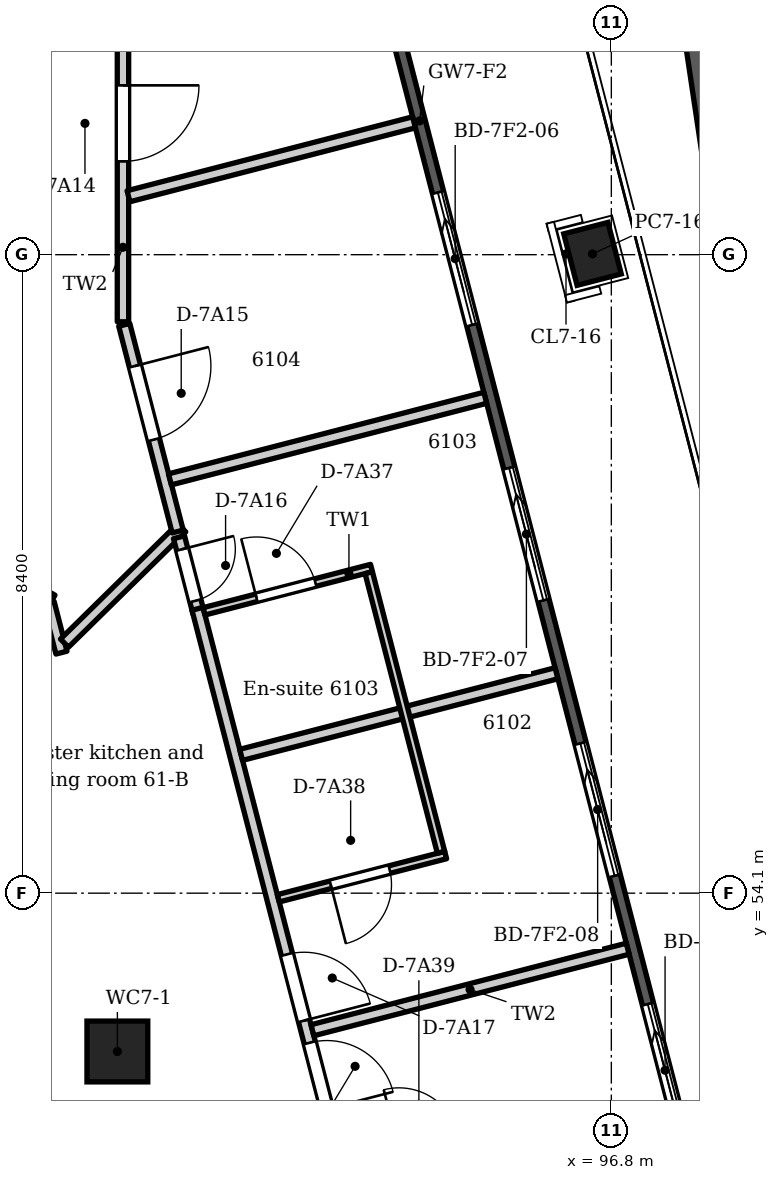
"""IFC4 building model, lengths in metres.
Left out: names, types, materials, properties, quantities, classifications, styles, units other than length and angle.
Written with IfcOpenShell. Run it as: python <this file> out.ifc"""

import sys

from ifc_helpers import new_model, si_unit, direction, frame, frame_2d, origin, origin_2d, place, context, subcontext, project, spatial, polyline, rectangle, circle, outline, extrude, element, fill, save


model = new_model("IFC4")
c1 = context("Model", 3, precision=1e-05, world=origin(), true_north=direction((0.0, 1.0)))
c2 = subcontext(c1, "Body", "Model", "MODEL_VIEW")
j1 = project(units=[si_unit("LENGTHUNIT", "METRE"), si_unit("PLANEANGLEUNIT", "RADIAN")], contexts=[c1])
p1 = place(None, origin())
s1 = spatial("IfcSite", under=j1, at=p1, CompositionType="ELEMENT")
p2 = place(p1, origin())
s2 = spatial("IfcBuilding", under=s1, at=p2, CompositionType="ELEMENT")
p3 = place(p2, frame((0.0, 0.0, 234.9)))
s3 = spatial("IfcBuildingStorey", under=s2, at=p3, CompositionType="ELEMENT", Elevation=234.9)
p4 = place(p3, frame((96.552, 62.51, -0.35), z_axis=(0.0, 0.0, 1.0), x_axis=(-0.250380004054, 0.968147640378, 0.0)))
e1 = element("IfcColumn", 1, at=p4, inside=s3, PredefinedType="COLUMN", context=c2, shape_type="SweptSolid", body=[
    extrude(rectangle(XDim=0.7, YDim=0.6, at=origin_2d()), origin(), (0.0, 0.0, 1.0), 3.95),
])
p5 = place(p3, frame((90.302, 52.017, -0.35), z_axis=(0.0, 0.0, 1.0), x_axis=(1.0, 0.0, 0.0)))
e2 = element("IfcColumn", 2, at=p5, inside=s3, PredefinedType="COLUMN", context=c2, shape_type="SweptSolid", body=[
    extrude(circle(Radius=0.4, at=origin_2d()), origin(), (0.0, 0.0, 1.0), 3.95),
])
p6 = place(p3, frame((89.591, 82.378, 0.0), z_axis=(0.0, 0.0, 1.0), x_axis=(0.250378839788, -0.968147941477, 0.0)))
e3 = element("IfcWall", 3, at=p6, inside=s3, PredefinedType="SOLIDWALL", context=c2, shape_type="SweptSolid", body=[
    extrude(outline(polyline([(0.149, 0.075), (0.149, -0.075), (33.537, -0.075), (33.537, 0.075), (0.149, 0.075)])), origin(), (0.0, 0.0, 1.0), 3.3),
])
p7 = place(p6, frame((1.171, 0.0, 0.0)))
e4 = element("IfcOpeningElement", 4, at=p7, cuts=e3, PredefinedType="OPENING", context=c2, shape_type="SweptSolid", body=[
    extrude(rectangle(XDim=1.8, YDim=2.6, at=frame_2d((0.9, 1.3))), frame((0.0, 0.085, 0.0), z_axis=(0.0, -1.0, 0.0), x_axis=(1.0, 0.0, 0.0)), (0.0, 0.0, 1.0), 0.17),
])
p8 = place(p6, frame((4.714, 0.0, 0.0)))
e5 = element("IfcOpeningElement", 5, at=p8, cuts=e3, PredefinedType="OPENING", context=c2, shape_type="SweptSolid", body=[
    extrude(rectangle(XDim=1.8, YDim=2.6, at=frame_2d((0.9, 1.3))), frame((0.0, 0.085, 0.0), z_axis=(0.0, -1.0, 0.0), x_axis=(1.0, 0.0, 0.0)), (0.0, 0.0, 1.0), 0.17),
])
p9 = place(p6, frame((8.457, 0.0, 0.0)))
e6 = element("IfcOpeningElement", 6, at=p9, cuts=e3, PredefinedType="OPENING", context=c2, shape_type="SweptSolid", body=[
    extrude(rectangle(XDim=1.8, YDim=2.6, at=frame_2d((0.9, 1.3))), frame((0.0, 0.085, 0.0), z_axis=(0.0, -1.0, 0.0), x_axis=(1.0, 0.0, 0.0)), (0.0, 0.0, 1.0), 0.17),
])
p10 = place(p6, frame((12.2, 0.0, 0.0)))
e7 = element("IfcOpeningElement", 7, at=p10, cuts=e3, PredefinedType="OPENING", context=c2, shape_type="SweptSolid", body=[
    extrude(rectangle(XDim=1.8, YDim=2.6, at=frame_2d((0.9, 1.3))), frame((0.0, 0.085, 0.0), z_axis=(0.0, -1.0, 0.0), x_axis=(1.0, 0.0, 0.0)), (0.0, 0.0, 1.0), 0.17),
])
p11 = place(p6, frame((15.943, 0.0, 0.0)))
e8 = element("IfcOpeningElement", 8, at=p11, cuts=e3, PredefinedType="OPENING", context=c2, shape_type="SweptSolid", body=[
    extrude(rectangle(XDim=1.8, YDim=2.6, at=frame_2d((0.9, 1.3))), frame((0.0, 0.085, 0.0), z_axis=(0.0, -1.0, 0.0), x_axis=(1.0, 0.0, 0.0)), (0.0, 0.0, 1.0), 0.17),
])
p12 = place(p6, frame((19.686, 0.0, 0.0)))
e9 = element("IfcOpeningElement", 9, at=p12, cuts=e3, PredefinedType="OPENING", context=c2, shape_type="SweptSolid", body=[
    extrude(rectangle(XDim=1.8, YDim=2.6, at=frame_2d((0.9, 1.3))), frame((0.0, 0.085, 0.0), z_axis=(0.0, -1.0, 0.0), x_axis=(1.0, 0.0, 0.0)), (0.0, 0.0, 1.0), 0.17),
])
p13 = place(p6, frame((23.429, 0.0, 0.0)))
e10 = element("IfcOpeningElement", 10, at=p13, cuts=e3, PredefinedType="OPENING", context=c2, shape_type="SweptSolid", body=[
    extrude(rectangle(XDim=1.8, YDim=2.6, at=frame_2d((0.9, 1.3))), frame((0.0, 0.085, 0.0), z_axis=(0.0, -1.0, 0.0), x_axis=(1.0, 0.0, 0.0)), (0.0, 0.0, 1.0), 0.17),
])
p14 = place(p6, frame((27.172, 0.0, 0.0)))
e11 = element("IfcOpeningElement", 11, at=p14, cuts=e3, PredefinedType="OPENING", context=c2, shape_type="SweptSolid", body=[
    extrude(rectangle(XDim=1.8, YDim=2.6, at=frame_2d((0.9, 1.3))), frame((0.0, 0.085, 0.0), z_axis=(0.0, -1.0, 0.0), x_axis=(1.0, 0.0, 0.0)), (0.0, 0.0, 1.0), 0.17),
])
p15 = place(p6, frame((30.715, 0.0, 0.0)))
e12 = element("IfcOpeningElement", 12, at=p15, cuts=e3, PredefinedType="OPENING", context=c2, shape_type="SweptSolid", body=[
    extrude(rectangle(XDim=1.8, YDim=2.6, at=frame_2d((0.9, 1.3))), frame((0.0, 0.085, 0.0), z_axis=(0.0, -1.0, 0.0), x_axis=(1.0, 0.0, 0.0)), (0.0, 0.0, 1.0), 0.17),
])
p16 = place(p3, frame((92.419, 44.255, 0.0), z_axis=(0.0, 0.0, 1.0), x_axis=(-0.963630586427, 0.267237895708, 0.0)))
e13 = element("IfcWall", 13, at=p16, inside=s3, PredefinedType="SOLIDWALL", context=c2, shape_type="SweptSolid", body=[
    extrude(outline(polyline([(0.149, 0.075), (0.149, -0.075), (33.537, -0.075), (33.537, 0.075), (0.149, 0.075)])), origin(), (0.0, 0.0, 1.0), 3.3),
])
p17 = place(p16, frame((1.171, 0.0, 0.0)))
e14 = element("IfcOpeningElement", 14, at=p17, cuts=e13, PredefinedType="OPENING", context=c2, shape_type="SweptSolid", body=[
    extrude(rectangle(XDim=1.8, YDim=2.6, at=frame_2d((0.9, 1.3))), frame((0.0, 0.085, 0.0), z_axis=(0.0, -1.0, 0.0), x_axis=(1.0, 0.0, 0.0)), (0.0, 0.0, 1.0), 0.17),
])
p18 = place(p16, frame((4.714, 0.0, 0.0)))
e15 = element("IfcOpeningElement", 15, at=p18, cuts=e13, PredefinedType="OPENING", context=c2, shape_type="SweptSolid", body=[
    extrude(rectangle(XDim=1.8, YDim=2.6, at=frame_2d((0.9, 1.3))), frame((0.0, 0.085, 0.0), z_axis=(0.0, -1.0, 0.0), x_axis=(1.0, 0.0, 0.0)), (0.0, 0.0, 1.0), 0.17),
])
p19 = place(p16, frame((8.457, 0.0, 0.0)))
e16 = element("IfcOpeningElement", 16, at=p19, cuts=e13, PredefinedType="OPENING", context=c2, shape_type="SweptSolid", body=[
    extrude(rectangle(XDim=1.8, YDim=2.6, at=frame_2d((0.9, 1.3))), frame((0.0, 0.085, 0.0), z_axis=(0.0, -1.0, 0.0), x_axis=(1.0, 0.0, 0.0)), (0.0, 0.0, 1.0), 0.17),
])
p20 = place(p16, frame((12.2, 0.0, 0.0)))
e17 = element("IfcOpeningElement", 17, at=p20, cuts=e13, PredefinedType="OPENING", context=c2, shape_type="SweptSolid", body=[
    extrude(rectangle(XDim=1.8, YDim=2.6, at=frame_2d((0.9, 1.3))), frame((0.0, 0.085, 0.0), z_axis=(0.0, -1.0, 0.0), x_axis=(1.0, 0.0, 0.0)), (0.0, 0.0, 1.0), 0.17),
])
p21 = place(p16, frame((15.943, 0.0, 0.0)))
e18 = element("IfcOpeningElement", 18, at=p21, cuts=e13, PredefinedType="OPENING", context=c2, shape_type="SweptSolid", body=[
    extrude(rectangle(XDim=1.8, YDim=2.6, at=frame_2d((0.9, 1.3))), frame((0.0, 0.085, 0.0), z_axis=(0.0, -1.0, 0.0), x_axis=(1.0, 0.0, 0.0)), (0.0, 0.0, 1.0), 0.17),
])
p22 = place(p16, frame((19.686, 0.0, 0.0)))
e19 = element("IfcOpeningElement", 19, at=p22, cuts=e13, PredefinedType="OPENING", context=c2, shape_type="SweptSolid", body=[
    extrude(rectangle(XDim=1.8, YDim=2.6, at=frame_2d((0.9, 1.3))), frame((0.0, 0.085, 0.0), z_axis=(0.0, -1.0, 0.0), x_axis=(1.0, 0.0, 0.0)), (0.0, 0.0, 1.0), 0.17),
])
p23 = place(p16, frame((23.429, 0.0, 0.0)))
e20 = element("IfcOpeningElement", 20, at=p23, cuts=e13, PredefinedType="OPENING", context=c2, shape_type="SweptSolid", body=[
    extrude(rectangle(XDim=1.8, YDim=2.6, at=frame_2d((0.9, 1.3))), frame((0.0, 0.085, 0.0), z_axis=(0.0, -1.0, 0.0), x_axis=(1.0, 0.0, 0.0)), (0.0, 0.0, 1.0), 0.17),
])
p24 = place(p16, frame((27.172, 0.0, 0.0)))
e21 = element("IfcOpeningElement", 21, at=p24, cuts=e13, PredefinedType="OPENING", context=c2, shape_type="SweptSolid", body=[
    extrude(rectangle(XDim=1.8, YDim=2.6, at=frame_2d((0.9, 1.3))), frame((0.0, 0.085, 0.0), z_axis=(0.0, -1.0, 0.0), x_axis=(1.0, 0.0, 0.0)), (0.0, 0.0, 1.0), 0.17),
])
p25 = place(p16, frame((30.715, 0.0, 0.0)))
e22 = element("IfcOpeningElement", 22, at=p25, cuts=e13, PredefinedType="OPENING", context=c2, shape_type="SweptSolid", body=[
    extrude(rectangle(XDim=1.8, YDim=2.6, at=frame_2d((0.9, 1.3))), frame((0.0, 0.085, 0.0), z_axis=(0.0, -1.0, 0.0), x_axis=(1.0, 0.0, 0.0)), (0.0, 0.0, 1.0), 0.17),
])
p26 = place(p3, origin())
e23 = element("IfcWall", 23, at=p26, inside=s3, PredefinedType="PARAPET", context=c2, shape_type="SweptSolid", body=[
    extrude(outline(polyline([(100.299, 50.419), (94.431, 89.683), (94.16, 89.468), (99.581, 53.198), (100.299, 50.419)])), origin(), (0.0, 0.0, 1.0), 1.1),
])
p27 = place(p3, frame((88.316, 56.155, 0.0), z_axis=(0.0, 0.0, 1.0), x_axis=(0.500129524705, 0.865950609745, 0.0)))
e24 = element("IfcWall", 24, at=p27, inside=s3, PredefinedType="PARTITIONING", context=c2, shape_type="SweptSolid", body=[
    extrude(rectangle(XDim=2.198, YDim=0.15, at=frame_2d((1.099, 0.0))), origin(), (0.0, 0.0, 1.0), 3.3),
])
p28 = place(p3, frame((89.397, 57.92, 0.0), z_axis=(0.0, 0.0, 1.0), x_axis=(0.249398389606, -0.968400972357, 0.0)))
e25 = element("IfcWall", 25, at=p28, inside=s3, PredefinedType="PARTITIONING", context=c2, shape_type="SweptSolid", body=[
    extrude(rectangle(XDim=0.677, YDim=0.15, at=frame_2d((0.339, 0.0))), origin(), (0.0, 0.0, 1.0), 3.3),
])
p29 = place(p3, frame((89.605, 57.39, 0.0), z_axis=(0.0, 0.0, 1.0), x_axis=(0.713117689353, 0.701044336068, 0.0)))
e26 = element("IfcWall", 26, at=p29, inside=s3, PredefinedType="PARTITIONING", context=c2, shape_type="SweptSolid", body=[
    extrude(rectangle(XDim=2.164, YDim=0.15, at=frame_2d((1.082, 0.0))), origin(), (0.0, 0.0, 1.0), 3.3),
])
p30 = place(p3, frame((90.375, 61.617, 0.0), z_axis=(0.0, 0.0, 1.0), x_axis=(0.0, 1.0, 0.0)))
e27 = element("IfcWall", 27, at=p30, inside=s3, PredefinedType="PARTITIONING", context=c2, shape_type="SweptSolid", body=[
    extrude(rectangle(XDim=3.588, YDim=0.15, at=frame_2d((1.794, 0.0))), origin(), (0.0, 0.0, 1.0), 3.3),
])
p31 = place(p30, frame((2.111, 0.0, 0.0)))
e28 = element("IfcOpeningElement", 28, at=p31, cuts=e27, PredefinedType="OPENING", context=c2, shape_type="SweptSolid", body=[
    extrude(rectangle(XDim=1.0, YDim=2.1, at=frame_2d((0.5, 1.05))), frame((0.0, 0.085, 0.0), z_axis=(0.0, -1.0, 0.0), x_axis=(1.0, 0.0, 0.0)), (0.0, 0.0, 1.0), 0.17),
])
p32 = place(p3, frame((90.448, 63.269, 0.0), z_axis=(0.0, 0.0, 1.0), x_axis=(0.968111141553, 0.250521092128, 0.0)))
e29 = element("IfcWall", 29, at=p32, inside=s3, PredefinedType="PARTITIONING", context=c2, shape_type="SweptSolid", body=[
    extrude(rectangle(XDim=3.881, YDim=0.15, at=frame_2d((1.94, 0.0))), origin(), (0.0, 0.0, 1.0), 3.3),
])
p33 = place(p3, frame((90.392, 61.577, 0.0), z_axis=(0.0, 0.0, 1.0), x_axis=(0.250280264266, -0.96817342936, 0.0)))
e30 = element("IfcWall", 30, at=p33, inside=s3, PredefinedType="PARTITIONING", context=c2, shape_type="SweptSolid", body=[
    extrude(rectangle(XDim=2.808, YDim=0.15, at=frame_2d((1.404, 0.0))), origin(), (0.0, 0.0, 1.0), 3.3),
])
p34 = place(p33, frame((0.56, 0.0, 0.0)))
e31 = element("IfcOpeningElement", 31, at=p34, cuts=e30, PredefinedType="OPENING", context=c2, shape_type="SweptSolid", body=[
    extrude(rectangle(XDim=1.0, YDim=2.1, at=frame_2d((0.5, 1.05))), frame((0.0, 0.085, 0.0), z_axis=(0.0, -1.0, 0.0), x_axis=(1.0, 0.0, 0.0)), (0.0, 0.0, 1.0), 0.17),
])
p35 = place(p3, frame((90.993, 59.544, 0.0), z_axis=(0.0, 0.0, 1.0), x_axis=(0.968129527106, 0.250450032434, 0.0)))
e32 = element("IfcWall", 32, at=p35, inside=s3, PredefinedType="PARTITIONING", context=c2, shape_type="SweptSolid", body=[
    extrude(rectangle(XDim=4.285, YDim=0.15, at=frame_2d((2.143, 0.0))), origin(), (0.0, 0.0, 1.0), 3.3),
])
p36 = place(p3, frame((91.113, 58.782, 0.0), z_axis=(0.0, 0.0, 1.0), x_axis=(0.249777676576, -0.968303212989, 0.0)))
e33 = element("IfcWall", 33, at=p36, inside=s3, PredefinedType="PARTITIONING", context=c2, shape_type="SweptSolid", body=[
    extrude(rectangle(XDim=1.03, YDim=0.15, at=frame_2d((0.515, 0.0))), origin(), (0.0, 0.0, 1.0), 3.3),
])
p37 = place(p36, frame((0.163, 0.0, 0.0)))
e34 = element("IfcOpeningElement", 34, at=p37, cuts=e33, PredefinedType="OPENING", context=c2, shape_type="SweptSolid", body=[
    extrude(rectangle(XDim=0.7, YDim=2.1, at=frame_2d((0.35, 1.05))), frame((0.0, 0.085, 0.0), z_axis=(0.0, -1.0, 0.0), x_axis=(1.0, 0.0, 0.0)), (0.0, 0.0, 1.0), 0.17),
])
p38 = place(p3, frame((91.355, 57.841, 0.0), z_axis=(0.0, 0.0, 1.0), x_axis=(0.25042530879, -0.968135922646, 0.0)))
e35 = element("IfcWall", 35, at=p38, inside=s3, PredefinedType="PARTITIONING", context=c2, shape_type="SweptSolid", body=[
    extrude(rectangle(XDim=9.565, YDim=0.15, at=frame_2d((4.782, 0.0))), origin(), (0.0, 0.0, 1.0), 2.75),
])
p39 = place(p38, frame((4.697, 0.0, 0.0)))
e36 = element("IfcOpeningElement", 36, at=p39, cuts=e35, PredefinedType="OPENING", context=c2, shape_type="SweptSolid", body=[
    extrude(rectangle(XDim=0.9, YDim=2.1, at=frame_2d((0.45, 1.05))), frame((0.0, 0.085, 0.0), z_axis=(0.0, -1.0, 0.0), x_axis=(1.0, 0.0, 0.0)), (0.0, 0.0, 1.0), 0.17),
])
p40 = place(p38, frame((5.897, 0.0, 0.0)))
e37 = element("IfcOpeningElement", 37, at=p40, cuts=e35, PredefinedType="OPENING", context=c2, shape_type="SweptSolid", body=[
    extrude(rectangle(XDim=0.9, YDim=2.1, at=frame_2d((0.45, 1.05))), frame((0.0, 0.085, 0.0), z_axis=(0.0, -1.0, 0.0), x_axis=(1.0, 0.0, 0.0)), (0.0, 0.0, 1.0), 0.17),
])
p41 = place(p3, frame((91.442, 57.808, 0.0), z_axis=(0.0, 0.0, 1.0), x_axis=(0.968154087165, 0.250355074856, 0.0)))
e38 = element("IfcWall", 38, at=p41, inside=s3, PredefinedType="PARTITIONING", context=c2, shape_type="SweptSolid", body=[
    extrude(rectangle(XDim=2.275, YDim=0.1, at=frame_2d((1.138, 0.0))), origin(), (0.0, 0.0, 1.0), 3.3),
])
p42 = place(p41, frame((0.713, 0.0, 0.0)))
e39 = element("IfcOpeningElement", 39, at=p42, cuts=e38, PredefinedType="OPENING", context=c2, shape_type="SweptSolid", body=[
    extrude(rectangle(XDim=0.8, YDim=2.1, at=frame_2d((0.4, 1.05))), frame((0.0, 0.06, 0.0), z_axis=(0.0, -1.0, 0.0), x_axis=(1.0, 0.0, 0.0)), (0.0, 0.0, 1.0), 0.12),
])
p43 = place(p3, frame((91.93, 55.92, 0.0), z_axis=(0.0, 0.0, 1.0), x_axis=(0.968143339783, 0.250396632634, 0.0)))
e40 = element("IfcWall", 40, at=p43, inside=s3, PredefinedType="PARTITIONING", context=c2, shape_type="SweptSolid", body=[
    extrude(rectangle(XDim=4.285, YDim=0.15, at=frame_2d((2.143, 0.0))), origin(), (0.0, 0.0, 1.0), 3.3),
])
p44 = place(p3, frame((92.419, 54.033, 0.0), z_axis=(0.0, 0.0, 1.0), x_axis=(0.968205218878, 0.250157258814, 0.0)))
e41 = element("IfcWall", 41, at=p44, inside=s3, PredefinedType="PARTITIONING", context=c2, shape_type="SweptSolid", body=[
    extrude(rectangle(XDim=2.274, YDim=0.1, at=frame_2d((1.137, 0.0))), origin(), (0.0, 0.0, 1.0), 3.3),
])
p45 = place(p44, frame((0.712, 0.0, 0.0)))
e42 = element("IfcOpeningElement", 42, at=p45, cuts=e41, PredefinedType="OPENING", context=c2, shape_type="SweptSolid", body=[
    extrude(rectangle(XDim=0.8, YDim=2.1, at=frame_2d((0.4, 1.05))), frame((0.0, 0.06, 0.0), z_axis=(0.0, -1.0, 0.0), x_axis=(1.0, 0.0, 0.0)), (0.0, 0.0, 1.0), 0.12),
])
p46 = place(p3, frame((92.868, 52.297, 0.0), z_axis=(0.0, 0.0, 1.0), x_axis=(0.968184295309, 0.250238227129, 0.0)))
e43 = element("IfcWall", 43, at=p46, inside=s3, PredefinedType="PARTITIONING", context=c2, shape_type="SweptSolid", body=[
    extrude(rectangle(XDim=4.284, YDim=0.15, at=frame_2d((2.142, 0.0))), origin(), (0.0, 0.0, 1.0), 3.3),
])
p47 = place(p3, frame((93.608, 58.317, 0.0), z_axis=(0.0, 0.0, 1.0), x_axis=(0.250297686366, -0.968168925446, 0.0)))
e44 = element("IfcWall", 44, at=p47, inside=s3, PredefinedType="PARTITIONING", context=c2, shape_type="SweptSolid", body=[
    extrude(rectangle(XDim=3.8, YDim=0.1, at=frame_2d((1.9, 0.0))), origin(), (0.0, 0.0, 1.0), 3.3),
])
p48 = place(p12, origin())
e45 = element("IfcDoor", 45, at=p48, inside=s3, OperationType="SLIDING_TO_LEFT", PredefinedType="DOOR", context=c2, shape_type="SweptSolid", body=[
    extrude(rectangle(XDim=1.8, YDim=2.6, at=frame_2d((0.9, 1.3))), frame((0.0, 0.025, 0.0), z_axis=(0.0, -1.0, 0.0), x_axis=(1.0, 0.0, 0.0)), (0.0, 0.0, 1.0), 0.05),
])
fill(e9, e45)
p49 = place(p13, origin())
e46 = element("IfcDoor", 46, at=p49, inside=s3, OperationType="SLIDING_TO_LEFT", PredefinedType="DOOR", context=c2, shape_type="SweptSolid", body=[
    extrude(rectangle(XDim=1.8, YDim=2.6, at=frame_2d((0.9, 1.3))), frame((0.0, 0.025, 0.0), z_axis=(0.0, -1.0, 0.0), x_axis=(1.0, 0.0, 0.0)), (0.0, 0.0, 1.0), 0.05),
])
fill(e10, e46)
p50 = place(p14, origin())
e47 = element("IfcDoor", 47, at=p50, inside=s3, OperationType="SLIDING_TO_LEFT", PredefinedType="DOOR", context=c2, shape_type="SweptSolid", body=[
    extrude(rectangle(XDim=1.8, YDim=2.6, at=frame_2d((0.9, 1.3))), frame((0.0, 0.025, 0.0), z_axis=(0.0, -1.0, 0.0), x_axis=(1.0, 0.0, 0.0)), (0.0, 0.0, 1.0), 0.05),
])
fill(e11, e47)
p51 = place(p15, origin())
e48 = element("IfcDoor", 48, at=p51, inside=s3, OperationType="SLIDING_TO_LEFT", PredefinedType="DOOR", context=c2, shape_type="SweptSolid", body=[
    extrude(rectangle(XDim=1.8, YDim=2.6, at=frame_2d((0.9, 1.3))), frame((0.0, 0.025, 0.0), z_axis=(0.0, -1.0, 0.0), x_axis=(1.0, 0.0, 0.0)), (0.0, 0.0, 1.0), 0.05),
])
fill(e12, e48)
p52 = place(p31, frame((1.0, 0.0, 0.0), z_axis=(0.0, 0.0, 1.0), x_axis=(-1.0, 0.0, 0.0)))
e49 = element("IfcDoor", 49, at=p52, inside=s3, OperationType="SINGLE_SWING_LEFT", PredefinedType="DOOR", context=c2, shape_type="SweptSolid", body=[
    extrude(rectangle(XDim=1.0, YDim=2.1, at=frame_2d((0.5, 1.05))), frame((0.0, 0.025, 0.0), z_axis=(0.0, -1.0, 0.0), x_axis=(1.0, 0.0, 0.0)), (0.0, 0.0, 1.0), 0.05),
])
fill(e28, e49)
p53 = place(p34, origin())
e50 = element("IfcDoor", 50, at=p53, inside=s3, OperationType="SINGLE_SWING_LEFT", PredefinedType="DOOR", context=c2, shape_type="SweptSolid", body=[
    extrude(rectangle(XDim=1.0, YDim=2.1, at=frame_2d((0.5, 1.05))), frame((0.0, 0.025, 0.0), z_axis=(0.0, -1.0, 0.0), x_axis=(1.0, 0.0, 0.0)), (0.0, 0.0, 1.0), 0.05),
])
fill(e31, e50)
p54 = place(p37, origin())
e51 = element("IfcDoor", 51, at=p54, inside=s3, OperationType="SINGLE_SWING_LEFT", PredefinedType="DOOR", context=c2, shape_type="SweptSolid", body=[
    extrude(rectangle(XDim=0.7, YDim=2.1, at=frame_2d((0.35, 1.05))), frame((0.0, 0.025, 0.0), z_axis=(0.0, -1.0, 0.0), x_axis=(1.0, 0.0, 0.0)), (0.0, 0.0, 1.0), 0.05),
])
fill(e34, e51)
p55 = place(p39, origin())
e52 = element("IfcDoor", 52, at=p55, inside=s3, OperationType="SINGLE_SWING_RIGHT", PredefinedType="DOOR", context=c2, shape_type="SweptSolid", body=[
    extrude(rectangle(XDim=0.9, YDim=2.1, at=frame_2d((0.45, 1.05))), frame((0.0, 0.025, 0.0), z_axis=(0.0, -1.0, 0.0), x_axis=(1.0, 0.0, 0.0)), (0.0, 0.0, 1.0), 0.05),
])
fill(e36, e52)
p56 = place(p40, origin())
e53 = element("IfcDoor", 53, at=p56, inside=s3, OperationType="SINGLE_SWING_RIGHT", PredefinedType="DOOR", context=c2, shape_type="SweptSolid", body=[
    extrude(rectangle(XDim=0.9, YDim=2.1, at=frame_2d((0.45, 1.05))), frame((0.0, 0.025, 0.0), z_axis=(0.0, -1.0, 0.0), x_axis=(1.0, 0.0, 0.0)), (0.0, 0.0, 1.0), 0.05),
])
fill(e37, e53)
p57 = place(p42, origin())
e54 = element("IfcDoor", 54, at=p57, inside=s3, OperationType="SINGLE_SWING_LEFT", PredefinedType="DOOR", context=c2, shape_type="SweptSolid", body=[
    extrude(rectangle(XDim=0.8, YDim=2.1, at=frame_2d((0.4, 1.05))), frame((0.0, 0.025, 0.0), z_axis=(0.0, -1.0, 0.0), x_axis=(1.0, 0.0, 0.0)), (0.0, 0.0, 1.0), 0.05),
])
fill(e39, e54)
p58 = place(p45, frame((0.8, 0.0, 0.0), z_axis=(0.0, 0.0, 1.0), x_axis=(-1.0, 0.0, 0.0)))
e55 = element("IfcDoor", 55, at=p58, inside=s3, OperationType="SINGLE_SWING_RIGHT", PredefinedType="DOOR", context=c2, shape_type="SweptSolid", body=[
    extrude(rectangle(XDim=0.8, YDim=2.1, at=frame_2d((0.4, 1.05))), frame((0.0, 0.025, 0.0), z_axis=(0.0, -1.0, 0.0), x_axis=(1.0, 0.0, 0.0)), (0.0, 0.0, 1.0), 0.05),
])
fill(e42, e55)
save(model, sys.argv[1])
